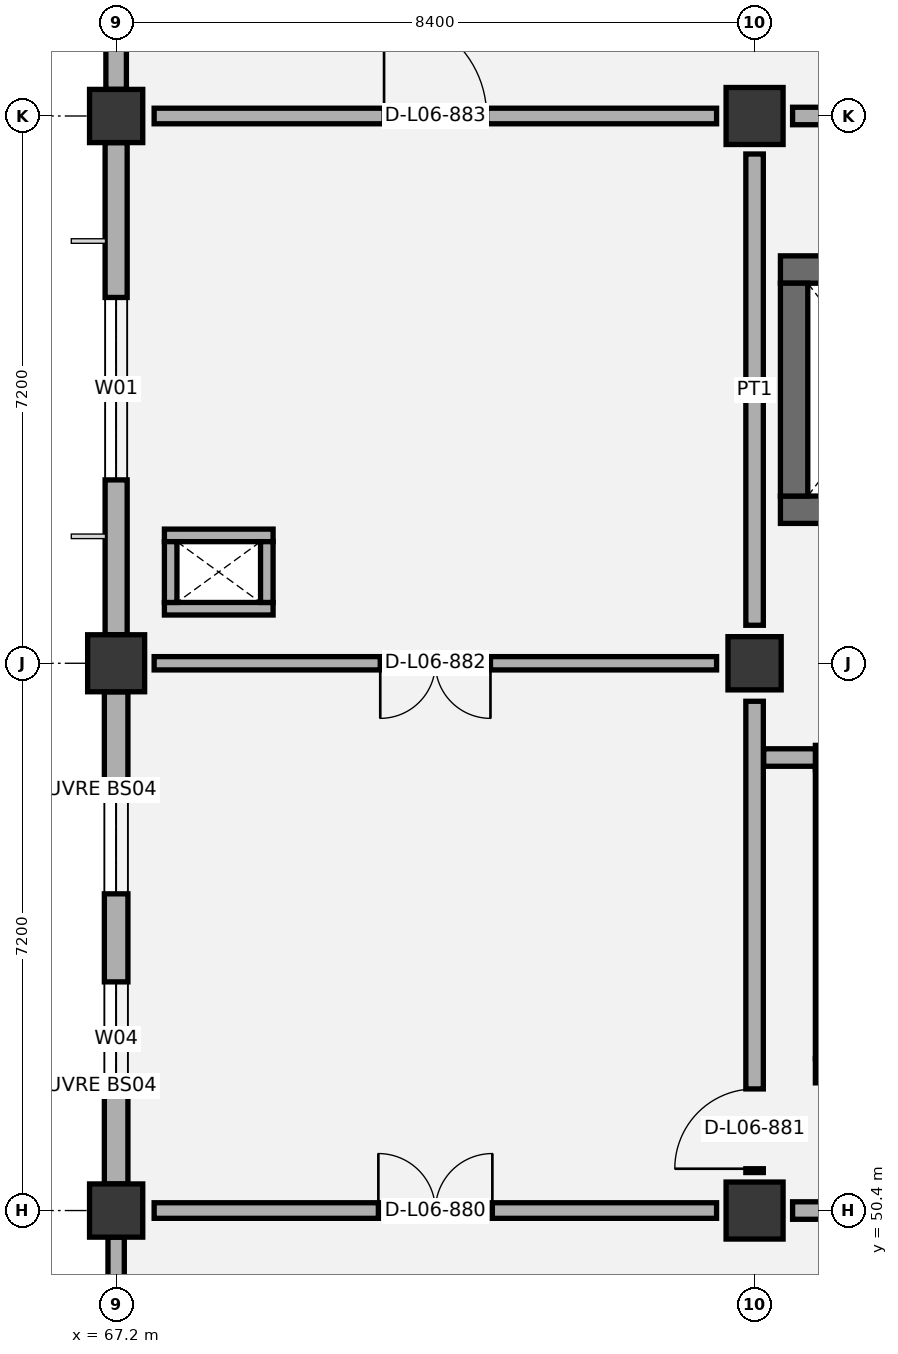
"""IFC4 building model, lengths in metres.
Left out: names, types, materials, properties, quantities, classifications, styles, units other than length and angle.
Written with IfcOpenShell. Run it as: python <this file> out.ifc"""

import sys

from ifc_helpers import new_model, si_unit, direction, frame, frame_2d, origin, origin_2d, place, context, subcontext, project, spatial, rectangle, extrude, element, fill, save


model = new_model("IFC4")
c1 = context("Model", 3, precision=1e-05, world=origin(), true_north=direction((0.0, 1.0)))
c2 = subcontext(c1, "Body", "Model", "MODEL_VIEW")
j1 = project(units=[si_unit("LENGTHUNIT", "METRE"), si_unit("PLANEANGLEUNIT", "RADIAN")], contexts=[c1])
p1 = place(None, origin())
s1 = spatial("IfcSite", under=j1, at=p1, CompositionType="ELEMENT")
p2 = place(p1, origin())
s2 = spatial("IfcBuilding", under=s1, at=p2, CompositionType="ELEMENT")
p3 = place(p2, frame((0.0, 0.0, 31.2)))
s3 = spatial("IfcBuildingStorey", under=s2, at=p3, CompositionType="ELEMENT", Elevation=31.2)
p4 = place(p3, frame((67.2, 50.4, 0.0), z_axis=(0.0, 0.0, 1.0), x_axis=(1.0, 0.0, 0.0)))
e1 = element("IfcColumn", 1, at=p4, inside=s3, PredefinedType="COLUMN", context=c2, shape_type="SweptSolid", body=[
    extrude(rectangle(XDim=0.7, YDim=0.7, at=origin_2d()), origin(), (0.0, 0.0, 1.0), 4.2),
])
p5 = place(p3, frame((67.2, 57.6, 0.0), z_axis=(0.0, 0.0, 1.0), x_axis=(1.0, 0.0, 0.0)))
e2 = element("IfcColumn", 2, at=p5, inside=s3, PredefinedType="COLUMN", context=c2, shape_type="SweptSolid", body=[
    extrude(rectangle(XDim=0.75, YDim=0.75, at=origin_2d()), origin(), (0.0, 0.0, 1.0), 4.2),
])
p6 = place(p3, frame((67.2, 64.8, 0.0), z_axis=(0.0, 0.0, 1.0), x_axis=(1.0, 0.0, 0.0)))
e3 = element("IfcColumn", 3, at=p6, inside=s3, PredefinedType="COLUMN", context=c2, shape_type="SweptSolid", body=[
    extrude(rectangle(XDim=0.7, YDim=0.7, at=origin_2d()), origin(), (0.0, 0.0, 1.0), 4.2),
])
p7 = place(p3, frame((75.6, 50.4, 0.0), z_axis=(0.0, 0.0, 1.0), x_axis=(1.0, 0.0, 0.0)))
e4 = element("IfcColumn", 4, at=p7, inside=s3, PredefinedType="COLUMN", context=c2, shape_type="SweptSolid", body=[
    extrude(rectangle(XDim=0.75, YDim=0.75, at=origin_2d()), origin(), (0.0, 0.0, 1.0), 4.2),
])
p8 = place(p3, frame((75.6, 57.6, 0.0), z_axis=(0.0, 0.0, 1.0), x_axis=(1.0, 0.0, 0.0)))
e5 = element("IfcColumn", 5, at=p8, inside=s3, PredefinedType="COLUMN", context=c2, shape_type="SweptSolid", body=[
    extrude(rectangle(XDim=0.7, YDim=0.7, at=origin_2d()), origin(), (0.0, 0.0, 1.0), 4.2),
])
p9 = place(p3, frame((75.6, 64.8, 0.0), z_axis=(0.0, 0.0, 1.0), x_axis=(1.0, 0.0, 0.0)))
e6 = element("IfcColumn", 6, at=p9, inside=s3, PredefinedType="COLUMN", context=c2, shape_type="SweptSolid", body=[
    extrude(rectangle(XDim=0.75, YDim=0.75, at=origin_2d()), origin(), (0.0, 0.0, 1.0), 4.2),
])
p10 = place(p3, frame((76.4, 52.24, 0.0), z_axis=(0.0, 0.0, 1.0), x_axis=(1.0, 0.0, 0.0)))
e7 = element("IfcWall", 7, at=p10, inside=s3, PredefinedType="SHEAR", context=c2, shape_type="SweptSolid", body=[
    extrude(rectangle(XDim=7.48, YDim=0.32, at=frame_2d((3.74, 0.0))), origin(), (0.0, 0.0, 1.0), 3.92),
])
p11 = place(p10, frame((0.45, 0.0, 0.0)))
e8 = element("IfcOpeningElement", 8, at=p11, cuts=e7, PredefinedType="OPENING", context=c2, shape_type="SweptSolid", body=[
    extrude(rectangle(XDim=1.05, YDim=2.15, at=frame_2d((0.525, 1.075))), frame((0.0, 0.17, 0.0), z_axis=(0.0, -1.0, 0.0), x_axis=(1.0, 0.0, 0.0)), (0.0, 0.0, 1.0), 0.34),
])
p12 = place(p3, frame((76.4, 56.36, 0.0), z_axis=(0.0, 0.0, 1.0), x_axis=(1.0, 0.0, 0.0)))
e9 = element("IfcWall", 9, at=p12, inside=s3, PredefinedType="SHEAR", context=c2, shape_type="SweptSolid", body=[
    extrude(rectangle(XDim=7.48, YDim=0.32, at=frame_2d((3.74, 0.0))), origin(), (0.0, 0.0, 1.0), 3.92),
])
p13 = place(p3, frame((76.56, 52.4, 0.0), z_axis=(0.0, 0.0, 1.0), x_axis=(0.0, 1.0, 0.0)))
e10 = element("IfcWall", 10, at=p13, inside=s3, PredefinedType="SHEAR", context=c2, shape_type="SweptSolid", body=[
    extrude(rectangle(XDim=3.8, YDim=0.32, at=frame_2d((1.9, 0.0))), origin(), (0.0, 0.0, 1.0), 3.92),
])
p14 = place(p3, frame((75.94, 62.78, 0.0), z_axis=(0.0, 0.0, 1.0), x_axis=(1.0, 0.0, 0.0)))
e11 = element("IfcWall", 11, at=p14, inside=s3, PredefinedType="SHEAR", context=c2, shape_type="SweptSolid", body=[
    extrude(rectangle(XDim=2.87, YDim=0.36, at=frame_2d((1.435, 0.0))), origin(), (0.0, 0.0, 1.0), 3.92),
])
p15 = place(p3, frame((75.94, 59.62, 0.0), z_axis=(0.0, 0.0, 1.0), x_axis=(1.0, 0.0, 0.0)))
e12 = element("IfcWall", 12, at=p15, inside=s3, PredefinedType="SHEAR", context=c2, shape_type="SweptSolid", body=[
    extrude(rectangle(XDim=2.87, YDim=0.36, at=frame_2d((1.435, 0.0))), origin(), (0.0, 0.0, 1.0), 3.92),
])
p16 = place(p15, frame((0.76, 0.0, 0.0)))
e13 = element("IfcOpeningElement", 13, at=p16, cuts=e12, PredefinedType="OPENING", context=c2, shape_type="SweptSolid", body=[
    extrude(rectangle(XDim=1.35, YDim=2.2, at=frame_2d((0.675, 1.1))), frame((0.0, 0.19, 0.0), z_axis=(0.0, -1.0, 0.0), x_axis=(1.0, 0.0, 0.0)), (0.0, 0.0, 1.0), 0.38),
])
p17 = place(p3, frame((76.12, 59.8, 0.0), z_axis=(0.0, 0.0, 1.0), x_axis=(0.0, 1.0, 0.0)))
e14 = element("IfcWall", 14, at=p17, inside=s3, PredefinedType="SHEAR", context=c2, shape_type="SweptSolid", body=[
    extrude(rectangle(XDim=2.8, YDim=0.36, at=frame_2d((1.4, 0.0))), origin(), (0.0, 0.0, 1.0), 3.92),
])
p18 = place(p3, frame((67.2, 43.575, 0.0), z_axis=(0.0, 0.0, 1.0), x_axis=(0.0, 1.0, 0.0)))
e15 = element("IfcWall", 15, at=p18, inside=s3, PredefinedType="SOLIDWALL", context=c2, shape_type="SweptSolid", body=[
    extrude(rectangle(XDim=6.475, YDim=0.215, at=frame_2d((3.238, 0.0))), origin(), (0.0, 0.0, 1.0), 3.365),
])
p19 = place(p18, frame((2.113, 0.0, 0.9)))
e16 = element("IfcOpeningElement", 16, at=p19, cuts=e15, PredefinedType="OPENING", context=c2, shape_type="SweptSolid", body=[
    extrude(rectangle(XDim=2.25, YDim=1.95, at=frame_2d((1.125, 0.975))), frame((0.0, 0.117, 0.0), z_axis=(0.0, -1.0, 0.0), x_axis=(1.0, 0.0, 0.0)), (0.0, 0.0, 1.0), 0.235),
])
p20 = place(p3, frame((67.2, 50.75, 0.0), z_axis=(0.0, 0.0, 1.0), x_axis=(0.0, 1.0, 0.0)))
e17 = element("IfcWall", 17, at=p20, inside=s3, PredefinedType="SOLIDWALL", context=c2, shape_type="SweptSolid", body=[
    extrude(rectangle(XDim=6.475, YDim=0.31, at=frame_2d((3.238, 0.0))), origin(), (0.0, 0.0, 1.0), 3.365),
])
p21 = place(p20, frame((1.158, 0.0, 0.9)))
e18 = element("IfcOpeningElement", 18, at=p21, cuts=e17, PredefinedType="OPENING", context=c2, shape_type="SweptSolid", body=[
    extrude(rectangle(XDim=1.5, YDim=1.8, at=frame_2d((0.75, 0.9))), frame((0.0, 0.165, 0.0), z_axis=(0.0, -1.0, 0.0), x_axis=(1.0, 0.0, 0.0)), (0.0, 0.0, 1.0), 0.33),
])
p22 = place(p20, frame((3.817, 0.0, 0.9)))
e19 = element("IfcOpeningElement", 19, at=p22, cuts=e17, PredefinedType="OPENING", context=c2, shape_type="SweptSolid", body=[
    extrude(rectangle(XDim=1.5, YDim=1.8, at=frame_2d((0.75, 0.9))), frame((0.0, 0.165, 0.0), z_axis=(0.0, -1.0, 0.0), x_axis=(1.0, 0.0, 0.0)), (0.0, 0.0, 1.0), 0.33),
])
p23 = place(p3, frame((67.2, 57.975, 0.0), z_axis=(0.0, 0.0, 1.0), x_axis=(0.0, 1.0, 0.0)))
e20 = element("IfcWall", 20, at=p23, inside=s3, PredefinedType="SOLIDWALL", context=c2, shape_type="SweptSolid", body=[
    extrude(rectangle(XDim=6.475, YDim=0.29, at=frame_2d((3.237, 0.0))), origin(), (0.0, 0.0, 1.0), 3.365),
])
p24 = place(p23, frame((2.038, 0.0, 0.9)))
e21 = element("IfcOpeningElement", 21, at=p24, cuts=e20, PredefinedType="OPENING", context=c2, shape_type="SweptSolid", body=[
    extrude(rectangle(XDim=2.4, YDim=1.8, at=frame_2d((1.2, 0.9))), frame((0.0, 0.155, 0.0), z_axis=(0.0, -1.0, 0.0), x_axis=(1.0, 0.0, 0.0)), (0.0, 0.0, 1.0), 0.31),
])
p25 = place(p3, frame((67.2, 65.15, 0.0), z_axis=(0.0, 0.0, 1.0), x_axis=(0.0, 1.0, 0.0)))
e22 = element("IfcWall", 22, at=p25, inside=s3, PredefinedType="SOLIDWALL", context=c2, shape_type="SweptSolid", body=[
    extrude(rectangle(XDim=6.475, YDim=0.27, at=frame_2d((3.238, 0.0))), origin(), (0.0, 0.0, 1.0), 3.365),
])
p26 = place(p25, frame((1.558, 0.0, 0.9)))
e23 = element("IfcOpeningElement", 23, at=p26, cuts=e22, PredefinedType="OPENING", context=c2, shape_type="SweptSolid", body=[
    extrude(rectangle(XDim=0.9, YDim=1.8, at=frame_2d((0.45, 0.9))), frame((0.0, 0.145, 0.0), z_axis=(0.0, -1.0, 0.0), x_axis=(1.0, 0.0, 0.0)), (0.0, 0.0, 1.0), 0.29),
])
p27 = place(p25, frame((4.017, 0.0, 0.9)))
e24 = element("IfcOpeningElement", 24, at=p27, cuts=e22, PredefinedType="OPENING", context=c2, shape_type="SweptSolid", body=[
    extrude(rectangle(XDim=0.9, YDim=1.8, at=frame_2d((0.45, 0.9))), frame((0.0, 0.145, 0.0), z_axis=(0.0, -1.0, 0.0), x_axis=(1.0, 0.0, 0.0)), (0.0, 0.0, 1.0), 0.29),
])
for number, where, z_axis, x_axis in (
    (25, (67.835, 58.317, 0.0), (0.0, 0.0, 1.0), (1.0, 0.0, 0.0)),
    (26, (67.835, 59.282, 0.0), (0.0, 0.0, 1.0), (1.0, 0.0, 0.0)),
):
    element("IfcWall", number, at=place(p3, frame(where, z_axis=z_axis, x_axis=x_axis)), inside=s3, PredefinedType="PARTITIONING", context=c2, shape_type="SweptSolid", body=[
        extrude(rectangle(XDim=1.43, YDim=0.165, at=frame_2d((0.715, 0.0))), origin(), (0.0, 0.0, 1.0), 3.92),
    ])
for number, where, z_axis, x_axis in (
    (27, (67.917, 58.4, 0.0), (0.0, 0.0, 1.0), (0.0, 1.0, 0.0)),
    (28, (69.183, 58.4, 0.0), (0.0, 0.0, 1.0), (0.0, 1.0, 0.0)),
):
    element("IfcWall", number, at=place(p3, frame(where, z_axis=z_axis, x_axis=x_axis)), inside=s3, PredefinedType="PARTITIONING", context=c2, shape_type="SweptSolid", body=[
        extrude(rectangle(XDim=0.8, YDim=0.165, at=frame_2d((0.4, 0.0))), origin(), (0.0, 0.0, 1.0), 3.92),
    ])
p28 = place(p3, frame((67.7, 50.4, 0.0), z_axis=(0.0, 0.0, 1.0), x_axis=(1.0, 0.0, 0.0)))
e29 = element("IfcWall", 29, at=p28, inside=s3, PredefinedType="PARTITIONING", context=c2, shape_type="SweptSolid", body=[
    extrude(rectangle(XDim=7.4, YDim=0.205, at=frame_2d((3.7, 0.0))), origin(), (0.0, 0.0, 1.0), 3.265),
])
p29 = place(p28, frame((2.95, 0.0, 0.0)))
e30 = element("IfcOpeningElement", 30, at=p29, cuts=e29, PredefinedType="OPENING", context=c2, shape_type="SweptSolid", body=[
    extrude(rectangle(XDim=1.5, YDim=2.2, at=frame_2d((0.75, 1.1))), frame((0.0, 0.113, 0.0), z_axis=(0.0, -1.0, 0.0), x_axis=(1.0, 0.0, 0.0)), (0.0, 0.0, 1.0), 0.225),
])
p30 = place(p3, frame((75.6, 50.9, 0.0), z_axis=(0.0, 0.0, 1.0), x_axis=(0.0, 1.0, 0.0)))
e31 = element("IfcWall", 31, at=p30, inside=s3, PredefinedType="PARTITIONING", context=c2, shape_type="SweptSolid", body=[
    extrude(rectangle(XDim=6.2, YDim=0.23, at=frame_2d((3.1, 0.0))), origin(), (0.0, 0.0, 1.0), 3.415),
])
p31 = place(p30, frame((0.05, 0.0, 0.0)))
e32 = element("IfcOpeningElement", 32, at=p31, cuts=e31, PredefinedType="OPENING", context=c2, shape_type="SweptSolid", body=[
    extrude(rectangle(XDim=1.05, YDim=2.15, at=frame_2d((0.525, 1.075))), frame((0.0, 0.125, 0.0), z_axis=(0.0, -1.0, 0.0), x_axis=(1.0, 0.0, 0.0)), (0.0, 0.0, 1.0), 0.25),
])
p32 = place(p3, frame((67.7, 57.6, 0.0), z_axis=(0.0, 0.0, 1.0), x_axis=(1.0, 0.0, 0.0)))
e33 = element("IfcWall", 33, at=p32, inside=s3, PredefinedType="PARTITIONING", context=c2, shape_type="SweptSolid", body=[
    extrude(rectangle(XDim=7.4, YDim=0.175, at=frame_2d((3.7, 0.0))), origin(), (0.0, 0.0, 1.0), 3.265),
])
p33 = place(p32, frame((2.975, 0.0, 0.0)))
e34 = element("IfcOpeningElement", 34, at=p33, cuts=e33, PredefinedType="OPENING", context=c2, shape_type="SweptSolid", body=[
    extrude(rectangle(XDim=1.45, YDim=2.2, at=frame_2d((0.725, 1.1))), frame((0.0, 0.097, 0.0), z_axis=(0.0, -1.0, 0.0), x_axis=(1.0, 0.0, 0.0)), (0.0, 0.0, 1.0), 0.195),
])
p34 = place(p3, frame((75.6, 58.1, 0.0), z_axis=(0.0, 0.0, 1.0), x_axis=(0.0, 1.0, 0.0)))
e35 = element("IfcWall", 35, at=p34, inside=s3, PredefinedType="PARTITIONING", context=c2, shape_type="SweptSolid", body=[
    extrude(rectangle(XDim=6.2, YDim=0.23, at=frame_2d((3.1, 0.0))), origin(), (0.0, 0.0, 1.0), 3.315),
])
p35 = place(p3, frame((67.7, 64.8, 0.0), z_axis=(0.0, 0.0, 1.0), x_axis=(1.0, 0.0, 0.0)))
e36 = element("IfcWall", 36, at=p35, inside=s3, PredefinedType="PARTITIONING", context=c2, shape_type="SweptSolid", body=[
    extrude(rectangle(XDim=7.4, YDim=0.205, at=frame_2d((3.7, 0.0))), origin(), (0.0, 0.0, 1.0), 3.265),
])
p36 = place(p35, frame((3.025, 0.0, 0.0)))
e37 = element("IfcOpeningElement", 37, at=p36, cuts=e36, PredefinedType="OPENING", context=c2, shape_type="SweptSolid", body=[
    extrude(rectangle(XDim=1.35, YDim=2.15, at=frame_2d((0.675, 1.075))), frame((0.0, 0.113, 0.0), z_axis=(0.0, -1.0, 0.0), x_axis=(1.0, 0.0, 0.0)), (0.0, 0.0, 1.0), 0.225),
])
p37 = place(p3, frame((76.1, 50.4, 0.0), z_axis=(0.0, 0.0, 1.0), x_axis=(1.0, 0.0, 0.0)))
e38 = element("IfcWall", 38, at=p37, inside=s3, PredefinedType="PARTITIONING", context=c2, shape_type="SweptSolid", body=[
    extrude(rectangle(XDim=7.4, YDim=0.23, at=frame_2d((3.7, 0.0))), origin(), (0.0, 0.0, 1.0), 3.265),
])
p38 = place(p37, frame((2.95, 0.0, 0.0)))
e39 = element("IfcOpeningElement", 39, at=p38, cuts=e38, PredefinedType="OPENING", context=c2, shape_type="SweptSolid", body=[
    extrude(rectangle(XDim=1.5, YDim=2.15, at=frame_2d((0.75, 1.075))), frame((0.0, 0.125, 0.0), z_axis=(0.0, -1.0, 0.0), x_axis=(1.0, 0.0, 0.0)), (0.0, 0.0, 1.0), 0.25),
])
p39 = place(p3, frame((75.72, 56.36, 0.0), z_axis=(0.0, 0.0, 1.0), x_axis=(1.0, 0.0, 0.0)))
e40 = element("IfcWall", 40, at=p39, inside=s3, PredefinedType="PARTITIONING", context=c2, shape_type="SweptSolid", body=[
    extrude(rectangle(XDim=0.68, YDim=0.23, at=frame_2d((0.34, 0.0))), origin(), (0.0, 0.0, 1.0), 3.92),
])
p40 = place(p3, frame((76.1, 64.8, 0.0), z_axis=(0.0, 0.0, 1.0), x_axis=(1.0, 0.0, 0.0)))
e41 = element("IfcWall", 41, at=p40, inside=s3, PredefinedType="PARTITIONING", context=c2, shape_type="SweptSolid", body=[
    extrude(rectangle(XDim=7.4, YDim=0.23, at=frame_2d((3.7, 0.0))), origin(), (0.0, 0.0, 1.0), 3.265),
])
p41 = place(p21, origin())
e42 = element("IfcWindow", 42, at=p41, inside=s3, PartitioningType="SINGLE_PANEL", PredefinedType="WINDOW", context=c2, shape_type="SweptSolid", body=[
    extrude(rectangle(XDim=1.5, YDim=1.8, at=frame_2d((0.75, 0.9))), frame((0.0, 0.03, 0.0), z_axis=(0.0, -1.0, 0.0), x_axis=(1.0, 0.0, 0.0)), (0.0, 0.0, 1.0), 0.06),
])
fill(e18, e42)
p42 = place(p22, origin())
e43 = element("IfcWindow", 43, at=p42, inside=s3, PartitioningType="SINGLE_PANEL", PredefinedType="WINDOW", context=c2, shape_type="SweptSolid", body=[
    extrude(rectangle(XDim=1.5, YDim=1.8, at=frame_2d((0.75, 0.9))), frame((0.0, 0.03, 0.0), z_axis=(0.0, -1.0, 0.0), x_axis=(1.0, 0.0, 0.0)), (0.0, 0.0, 1.0), 0.06),
])
fill(e19, e43)
p43 = place(p24, origin())
e44 = element("IfcWindow", 44, at=p43, inside=s3, PartitioningType="SINGLE_PANEL", PredefinedType="WINDOW", context=c2, shape_type="SweptSolid", body=[
    extrude(rectangle(XDim=2.4, YDim=1.8, at=frame_2d((1.2, 0.9))), frame((0.0, 0.03, 0.0), z_axis=(0.0, -1.0, 0.0), x_axis=(1.0, 0.0, 0.0)), (0.0, 0.0, 1.0), 0.06),
])
fill(e21, e44)
p44 = place(p29, origin())
e45 = element("IfcDoor", 45, at=p44, inside=s3, OperationType="DOUBLE_DOOR_SINGLE_SWING", PredefinedType="DOOR", context=c2, shape_type="SweptSolid", body=[
    extrude(rectangle(XDim=1.5, YDim=2.2, at=frame_2d((0.75, 1.1))), frame((0.0, 0.025, 0.0), z_axis=(0.0, -1.0, 0.0), x_axis=(1.0, 0.0, 0.0)), (0.0, 0.0, 1.0), 0.05),
])
fill(e30, e45)
p45 = place(p31, origin())
e46 = element("IfcDoor", 46, at=p45, inside=s3, OperationType="SINGLE_SWING_LEFT", PredefinedType="DOOR", context=c2, shape_type="SweptSolid", body=[
    extrude(rectangle(XDim=1.05, YDim=2.15, at=frame_2d((0.525, 1.075))), frame((0.0, 0.025, 0.0), z_axis=(0.0, -1.0, 0.0), x_axis=(1.0, 0.0, 0.0)), (0.0, 0.0, 1.0), 0.05),
])
fill(e32, e46)
p46 = place(p33, frame((1.45, 0.0, 0.0), z_axis=(0.0, 0.0, 1.0), x_axis=(-1.0, 0.0, 0.0)))
e47 = element("IfcDoor", 47, at=p46, inside=s3, OperationType="DOUBLE_DOOR_SINGLE_SWING", PredefinedType="DOOR", context=c2, shape_type="SweptSolid", body=[
    extrude(rectangle(XDim=1.45, YDim=2.2, at=frame_2d((0.725, 1.1))), frame((0.0, 0.025, 0.0), z_axis=(0.0, -1.0, 0.0), x_axis=(1.0, 0.0, 0.0)), (0.0, 0.0, 1.0), 0.05),
])
fill(e34, e47)
p47 = place(p36, origin())
e48 = element("IfcDoor", 48, at=p47, inside=s3, OperationType="SINGLE_SWING_LEFT", PredefinedType="DOOR", context=c2, shape_type="SweptSolid", body=[
    extrude(rectangle(XDim=1.35, YDim=2.15, at=frame_2d((0.675, 1.075))), frame((0.0, 0.025, 0.0), z_axis=(0.0, -1.0, 0.0), x_axis=(1.0, 0.0, 0.0)), (0.0, 0.0, 1.0), 0.05),
])
fill(e37, e48)
save(model, sys.argv[1])
